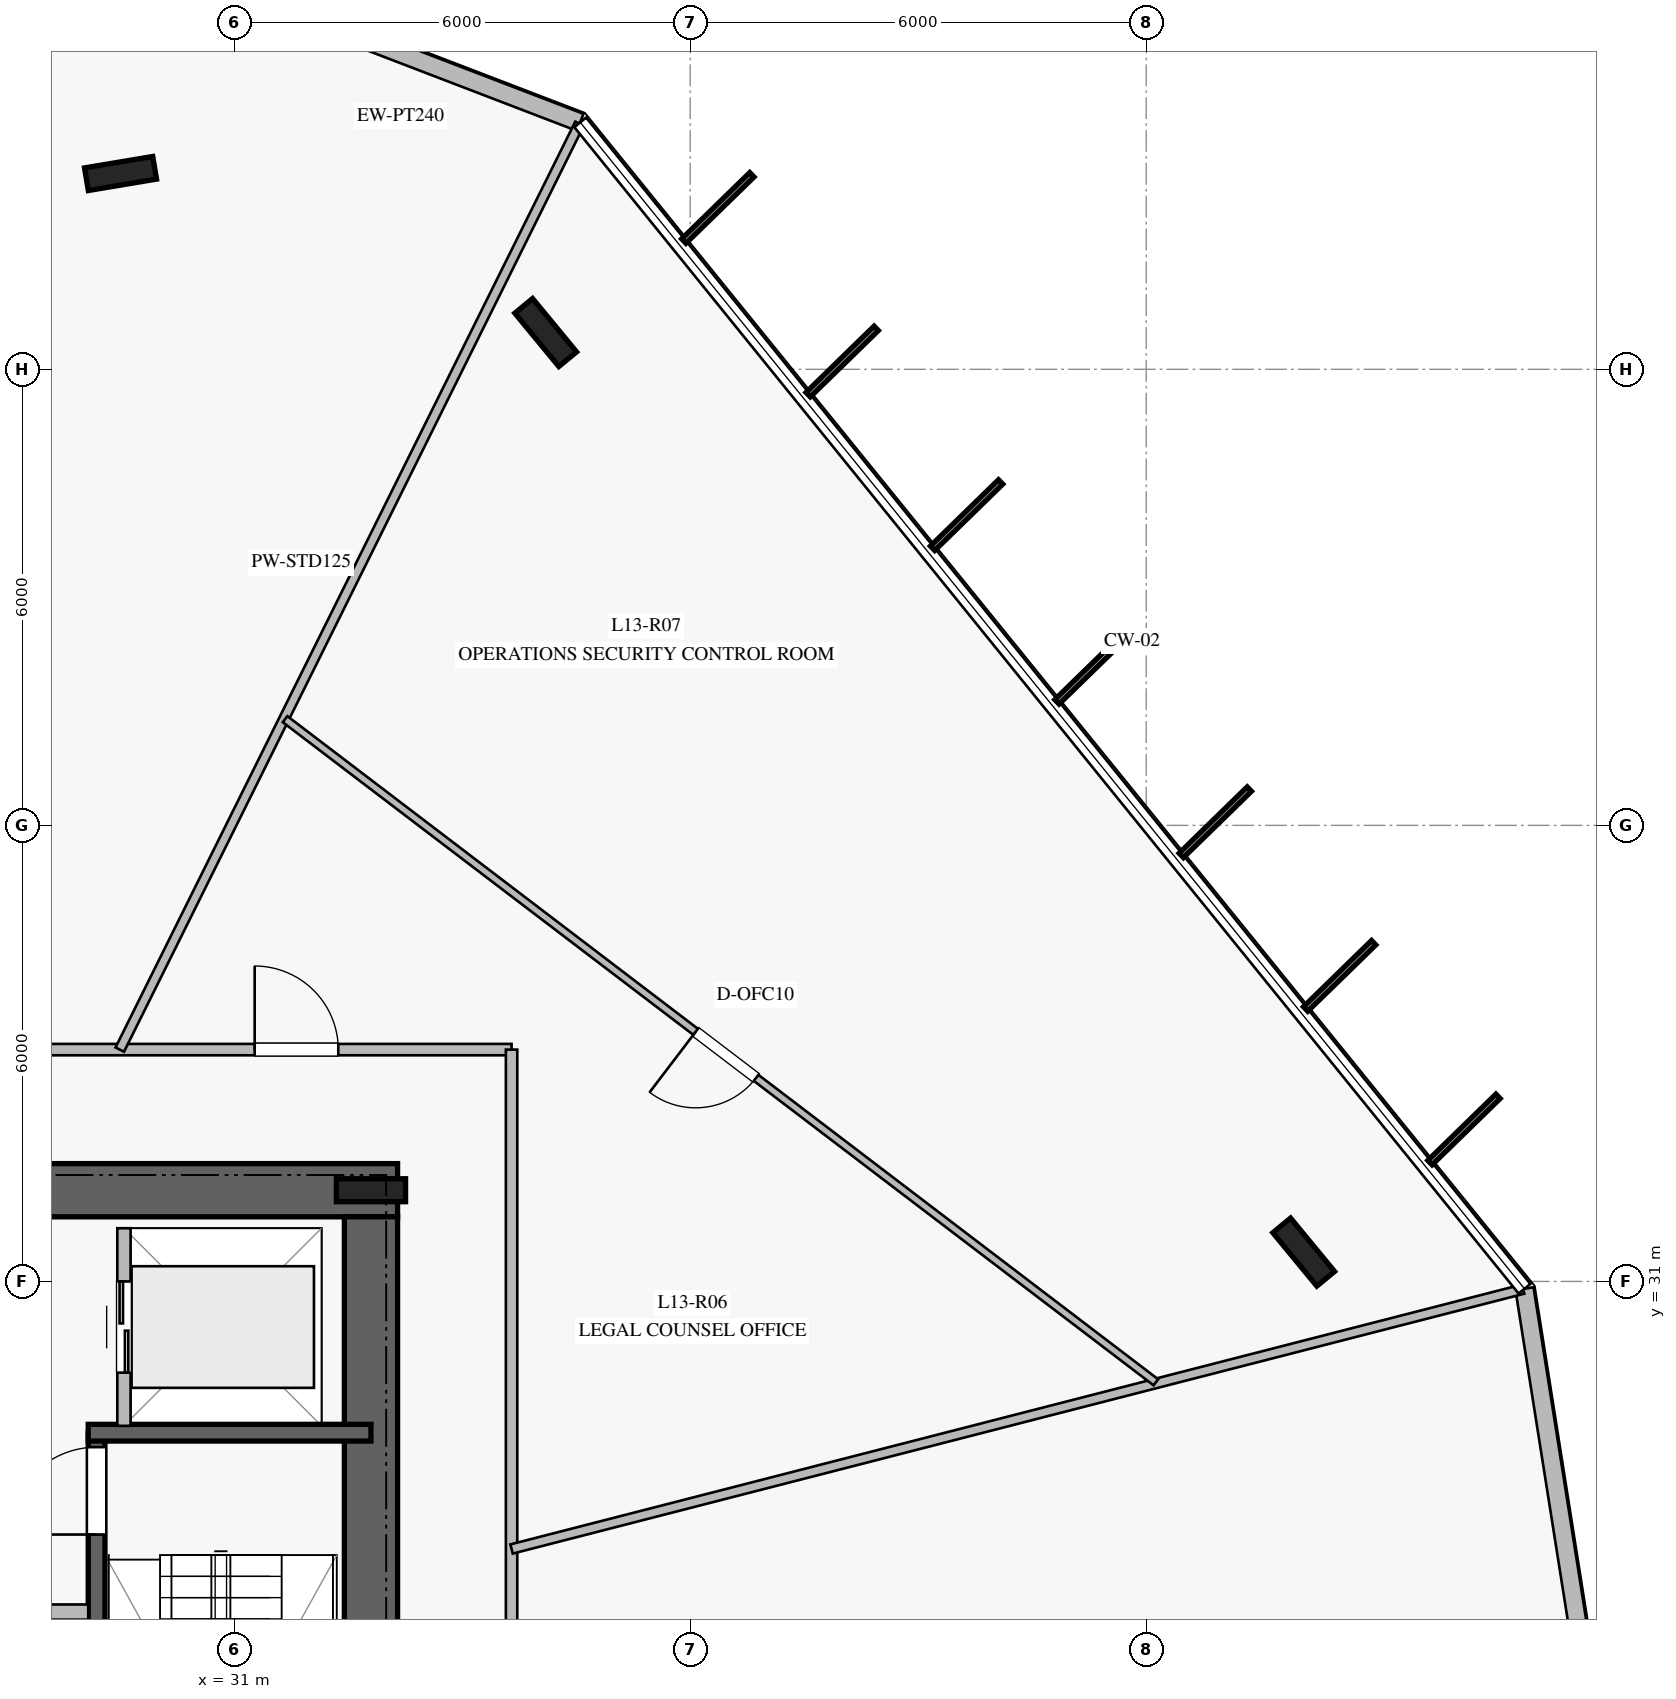
"""IFC4 building model, lengths in metres.
Left out: names, types, materials, properties, quantities, classifications, styles, units other than length and angle.
Written with IfcOpenShell. Run it as: python <this file> out.ifc"""

import sys

from ifc_helpers import new_model, si_unit, direction, frame, frame_2d, origin, origin_2d, place, context, subcontext, project, spatial, rectangle, i_section, extrude, element, fill, save


model = new_model("IFC4")
c1 = context("Model", 3, precision=1e-05, world=origin(), true_north=direction((0.0, 1.0)))
c2 = subcontext(c1, "Body", "Model", "MODEL_VIEW")
j1 = project(units=[si_unit("LENGTHUNIT", "METRE"), si_unit("PLANEANGLEUNIT", "RADIAN")], contexts=[c1])
p1 = place(None, origin())
s1 = spatial("IfcSite", under=j1, at=p1, CompositionType="ELEMENT")
p2 = place(p1, origin())
s2 = spatial("IfcBuilding", under=s1, at=p2, CompositionType="ELEMENT")
p3 = place(p2, frame((0.0, 0.0, 56.0)))
s3 = spatial("IfcBuildingStorey", under=s2, at=p3, CompositionType="ELEMENT", Elevation=56.0)
p4 = place(p3, frame((33.15, 32.2, 0.0), z_axis=(0.0, 0.0, 1.0), x_axis=(-1.0, 0.0, 0.0)))
e1 = element("IfcWall", 1, at=p4, inside=s3, PredefinedType="SHEAR", context=c2, shape_type="SweptSolid", body=[
    extrude(rectangle(XDim=16.3, YDim=0.7, at=frame_2d((8.15, 0.0))), origin(), (0.0, 0.0, 1.0), 3.76),
])
p5 = place(p4, frame((5.1, 0.0, 0.0)))
e2 = element("IfcOpeningElement", 2, at=p5, cuts=e1, PredefinedType="OPENING", context=c2, shape_type="SweptSolid", body=[
    extrude(rectangle(XDim=1.2, YDim=2.25, at=frame_2d((0.6, 1.125))), frame((0.0, 0.36, 0.0), z_axis=(0.0, -1.0, 0.0), x_axis=(1.0, 0.0, 0.0)), (0.0, 0.0, 1.0), 0.72),
])
p6 = place(p3, frame((32.8, 18.15, 0.0), z_axis=(0.0, 0.0, 1.0), x_axis=(0.0, 1.0, 0.0)))
e3 = element("IfcWall", 3, at=p6, inside=s3, PredefinedType="SHEAR", context=c2, shape_type="SweptSolid", body=[
    extrude(rectangle(XDim=13.7, YDim=0.7, at=frame_2d((6.85, 0.0))), origin(), (0.0, 0.0, 1.0), 3.76),
])
p7 = place(p3, frame((32.8, 32.2, 0.0), z_axis=(0.0, 0.0, 1.0), x_axis=(1.0, 0.0, 0.0)))
e4 = element("IfcColumn", 4, at=p7, inside=s3, PredefinedType="COLUMN", context=c2, shape_type="SweptSolid", body=[
    extrude(i_section(OverallWidth=0.302, OverallDepth=0.91, WebThickness=0.021, FlangeThickness=0.04, at=origin_2d()), origin(), (0.0, 0.0, 1.0), 4.0),
])
p8 = place(p3, frame((29.19, 21.79, 0.0), z_axis=(0.0, 0.0, 1.0), x_axis=(0.0, 1.0, 0.0)))
e5 = element("IfcWall", 5, at=p8, inside=s3, PredefinedType="SOLIDWALL", context=c2, shape_type="SweptSolid", body=[
    extrude(rectangle(XDim=7.22, YDim=0.22, at=frame_2d((3.61, 0.0))), origin(), (0.0, 0.0, 1.0), 3.76),
])
p9 = place(p8, frame((5.88, 0.0, 0.0)))
e6 = element("IfcOpeningElement", 6, at=p9, cuts=e5, PredefinedType="OPENING", context=c2, shape_type="SweptSolid", body=[
    extrude(rectangle(XDim=1.15, YDim=2.2, at=frame_2d((0.575, 1.1))), frame((0.0, 0.12, 0.0), z_axis=(0.0, -1.0, 0.0), x_axis=(1.0, 0.0, 0.0)), (0.0, 0.0, 1.0), 0.24),
])
p10 = place(p3, frame((29.08, 29.01, 0.0), z_axis=(0.0, 0.0, 1.0), x_axis=(1.0, 0.0, 0.0)))
e7 = element("IfcWall", 7, at=p10, inside=s3, PredefinedType="SOLIDWALL", context=c2, shape_type="SweptSolid", body=[
    extrude(rectangle(XDim=3.72, YDim=0.22, at=frame_2d((1.86, 0.0))), origin(), (0.0, 0.0, 1.0), 3.76),
])
for number, where, z_axis, x_axis in (
    (8, (45.072, 31.386, 0.0), (0.0, 0.0, 1.0), (-0.636, 0.772, 0.0)),
    (9, (35.099, 43.484, 0.0), (0.0, 0.0, 1.0), (-0.636, 0.772, 0.0)),
    (10, (29.505, 45.576, 0.0), (0.0, 0.0, 1.0), (0.986, 0.165, 0.0)),
):
    element("IfcColumn", number, at=place(p3, frame(where, z_axis=z_axis, x_axis=x_axis)), inside=s3, PredefinedType="COLUMN", context=c2, shape_type="SweptSolid", body=[
        extrude(i_section(OverallWidth=0.302, OverallDepth=0.91, WebThickness=0.021, FlangeThickness=0.04, at=origin_2d()), origin(), (0.0, 0.0, 1.0), 4.0),
    ])
p11 = place(p3, frame((35.553, 46.249, 0.0), z_axis=(0.0, 0.0, 1.0), x_axis=(-0.933681352495, 0.358104917591, 0.0)))
e11 = element("IfcWall", 11, at=p11, inside=s3, PredefinedType="STANDARD", context=c2, shape_type="SweptSolid", body=[
    extrude(rectangle(XDim=4.474, YDim=0.24, at=frame_2d((2.237, 0.0))), origin(), (0.0, 0.0, 1.0), 3.76),
])
p12 = place(p3, frame((48.677, 26.485, 0.0), z_axis=(0.0, 0.0, 1.0), x_axis=(-0.156447327705, 0.987686303263, 0.0)))
e12 = element("IfcWall", 12, at=p12, inside=s3, PredefinedType="STANDARD", context=c2, shape_type="SweptSolid", body=[
    extrude(rectangle(XDim=4.474, YDim=0.24, at=frame_2d((2.237, 0.0))), origin(), (0.0, 0.0, 1.0), 3.76),
])
p13 = place(p3, frame((25.7, 26.65, 0.0), z_axis=(0.0, 0.0, 1.0), x_axis=(1.0, 0.0, 0.0)))
e13 = element("IfcWall", 13, at=p13, inside=s3, PredefinedType="PARTITIONING", context=c2, shape_type="SweptSolid", body=[
    extrude(rectangle(XDim=3.38, YDim=0.2, at=frame_2d((1.69, 0.0))), origin(), (0.0, 0.0, 1.0), 3.76),
])
p14 = place(p3, frame((29.55, 29.1, 0.0), z_axis=(0.0, 0.0, 1.0), x_axis=(0.0, 1.0, 0.0)))
e14 = element("IfcWall", 14, at=p14, inside=s3, PredefinedType="PARTITIONING", context=c2, shape_type="SweptSolid", body=[
    extrude(rectangle(XDim=2.6, YDim=0.175, at=frame_2d((1.3, 0.0))), origin(), (0.0, 0.0, 1.0), 3.76),
])
p15 = place(p14, frame((0.7, 0.0, 0.0)))
e15 = element("IfcOpeningElement", 15, at=p15, cuts=e14, PredefinedType="OPENING", context=c2, shape_type="SweptSolid", body=[
    extrude(rectangle(XDim=1.2, YDim=2.2, at=frame_2d((0.6, 1.1))), frame((0.0, 0.098, 0.0), z_axis=(0.0, -1.0, 0.0), x_axis=(1.0, 0.0, 0.0)), (0.0, 0.0, 1.0), 0.195),
])
p16 = place(p3, frame((15.35, 34.05, 0.0), z_axis=(0.0, 0.0, 1.0), x_axis=(1.0, 0.0, 0.0)))
e16 = element("IfcWall", 16, at=p16, inside=s3, PredefinedType="PARTITIONING", context=c2, shape_type="SweptSolid", body=[
    extrude(rectangle(XDim=19.3, YDim=0.15, at=frame_2d((9.65, 0.0))), origin(), (0.0, 0.0, 1.0), 3.21),
])
p17 = place(p16, frame((15.92, 0.0, 0.0)))
e17 = element("IfcOpeningElement", 17, at=p17, cuts=e16, PredefinedType="OPENING", context=c2, shape_type="SweptSolid", body=[
    extrude(rectangle(XDim=1.1, YDim=2.2, at=frame_2d((0.55, 1.1))), frame((0.0, 0.085, 0.0), z_axis=(0.0, -1.0, 0.0), x_axis=(1.0, 0.0, 0.0)), (0.0, 0.0, 1.0), 0.17),
])
p18 = place(p16, frame((9.533, 0.0, 0.0)))
e18 = element("IfcOpeningElement", 18, at=p18, cuts=e16, PredefinedType="OPENING", context=c2, shape_type="SweptSolid", body=[
    extrude(rectangle(XDim=1.1, YDim=2.2, at=frame_2d((0.55, 1.1))), frame((0.0, 0.085, 0.0), z_axis=(0.0, -1.0, 0.0), x_axis=(1.0, 0.0, 0.0)), (0.0, 0.0, 1.0), 0.17),
])
p19 = place(p16, frame((2.625, 0.0, 0.0)))
e19 = element("IfcOpeningElement", 19, at=p19, cuts=e16, PredefinedType="OPENING", context=c2, shape_type="SweptSolid", body=[
    extrude(rectangle(XDim=1.1, YDim=2.2, at=frame_2d((0.55, 1.1))), frame((0.0, 0.085, 0.0), z_axis=(0.0, -1.0, 0.0), x_axis=(1.0, 0.0, 0.0)), (0.0, 0.0, 1.0), 0.17),
])
p20 = place(p3, frame((34.65, 34.05, 0.0), z_axis=(0.0, 0.0, 1.0), x_axis=(0.0, -1.0, 0.0)))
e20 = element("IfcWall", 20, at=p20, inside=s3, PredefinedType="PARTITIONING", context=c2, shape_type="SweptSolid", body=[
    extrude(rectangle(XDim=18.1, YDim=0.15, at=frame_2d((9.05, 0.0))), origin(), (0.0, 0.0, 1.0), 3.21),
])
p21 = place(p20, frame((15.616, 0.0, 0.0)))
e21 = element("IfcOpeningElement", 21, at=p21, cuts=e20, PredefinedType="OPENING", context=c2, shape_type="SweptSolid", body=[
    extrude(rectangle(XDim=1.1, YDim=2.2, at=frame_2d((0.55, 1.1))), frame((0.0, 0.085, 0.0), z_axis=(0.0, -1.0, 0.0), x_axis=(1.0, 0.0, 0.0)), (0.0, 0.0, 1.0), 0.17),
])
p22 = place(p20, frame((10.114, 0.0, 0.0)))
e22 = element("IfcOpeningElement", 22, at=p22, cuts=e20, PredefinedType="OPENING", context=c2, shape_type="SweptSolid", body=[
    extrude(rectangle(XDim=1.1, YDim=2.2, at=frame_2d((0.55, 1.1))), frame((0.0, 0.085, 0.0), z_axis=(0.0, -1.0, 0.0), x_axis=(1.0, 0.0, 0.0)), (0.0, 0.0, 1.0), 0.17),
])
p23 = place(p3, frame((29.495, 34.05, 0.0), z_axis=(0.0, 0.0, 1.0), x_axis=(0.444763351691, 0.895648123424, 0.0)))
e23 = element("IfcWall", 23, at=p23, inside=s3, PredefinedType="PARTITIONING", context=c2, shape_type="SweptSolid", body=[
    extrude(rectangle(XDim=13.6, YDim=0.125, at=frame_2d((6.8, 0.0))), origin(), (0.0, 0.0, 1.0), 3.06),
])
p24 = place(p3, frame((34.65, 27.48, 0.0), z_axis=(0.0, 0.0, 1.0), x_axis=(0.96855240957, 0.248809625851, 0.0)))
e24 = element("IfcWall", 24, at=p24, inside=s3, PredefinedType="PARTITIONING", context=c2, shape_type="SweptSolid", body=[
    extrude(rectangle(XDim=13.741, YDim=0.125, at=frame_2d((6.871, 0.0))), origin(), (0.0, 0.0, 1.0), 3.06),
])
p25 = place(p3, frame((43.127, 29.673, 0.0), z_axis=(0.0, 0.0, 1.0), x_axis=(-0.795608764692, 0.605810773712, 0.0)))
e25 = element("IfcWall", 25, at=p25, inside=s3, PredefinedType="MOVABLE", context=c2, shape_type="SweptSolid", body=[
    extrude(rectangle(XDim=14.4, YDim=0.1, at=frame_2d((7.2, 0.0))), origin(), (0.0, 0.0, 1.0), 3.21),
])
p26 = place(p25, frame((6.611, 0.0, 0.0)))
e26 = element("IfcOpeningElement", 26, at=p26, cuts=e25, PredefinedType="OPENING", context=c2, shape_type="SweptSolid", body=[
    extrude(rectangle(XDim=1.0, YDim=2.15, at=frame_2d((0.5, 1.075))), frame((0.0, 0.06, 0.0), z_axis=(0.0, -1.0, 0.0), x_axis=(1.0, 0.0, 0.0)), (0.0, 0.0, 1.0), 0.12),
])
p27 = place(p9, origin())
e27 = element("IfcDoor", 27, at=p27, inside=s3, OperationType="SINGLE_SWING_LEFT", PredefinedType="DOOR", context=c2, shape_type="SweptSolid", body=[
    extrude(rectangle(XDim=1.15, YDim=2.2, at=frame_2d((0.575, 1.1))), frame((0.0, 0.025, 0.0), z_axis=(0.0, -1.0, 0.0), x_axis=(1.0, 0.0, 0.0)), (0.0, 0.0, 1.0), 0.05),
])
fill(e6, e27)
p28 = place(p15, origin())
e28 = element("IfcDoor", 28, at=p28, inside=s3, OperationType="DOUBLE_DOOR_SLIDING", PredefinedType="DOOR", context=c2, shape_type="SweptSolid", body=[
    extrude(rectangle(XDim=1.2, YDim=2.2, at=frame_2d((0.6, 1.1))), frame((0.0, 0.025, 0.0), z_axis=(0.0, -1.0, 0.0), x_axis=(1.0, 0.0, 0.0)), (0.0, 0.0, 1.0), 0.05),
])
fill(e15, e28)
p29 = place(p17, origin())
e29 = element("IfcDoor", 29, at=p29, inside=s3, OperationType="SINGLE_SWING_LEFT", PredefinedType="DOOR", context=c2, shape_type="SweptSolid", body=[
    extrude(rectangle(XDim=1.1, YDim=2.2, at=frame_2d((0.55, 1.1))), frame((0.0, 0.025, 0.0), z_axis=(0.0, -1.0, 0.0), x_axis=(1.0, 0.0, 0.0)), (0.0, 0.0, 1.0), 0.05),
])
fill(e17, e29)
p30 = place(p26, origin())
e30 = element("IfcDoor", 30, at=p30, inside=s3, OperationType="SINGLE_SWING_RIGHT", PredefinedType="DOOR", context=c2, shape_type="SweptSolid", body=[
    extrude(rectangle(XDim=1.0, YDim=2.15, at=frame_2d((0.5, 1.075))), frame((0.0, 0.025, 0.0), z_axis=(0.0, -1.0, 0.0), x_axis=(1.0, 0.0, 0.0)), (0.0, 0.0, 1.0), 0.05),
])
fill(e26, e30)
save(model, sys.argv[1])
